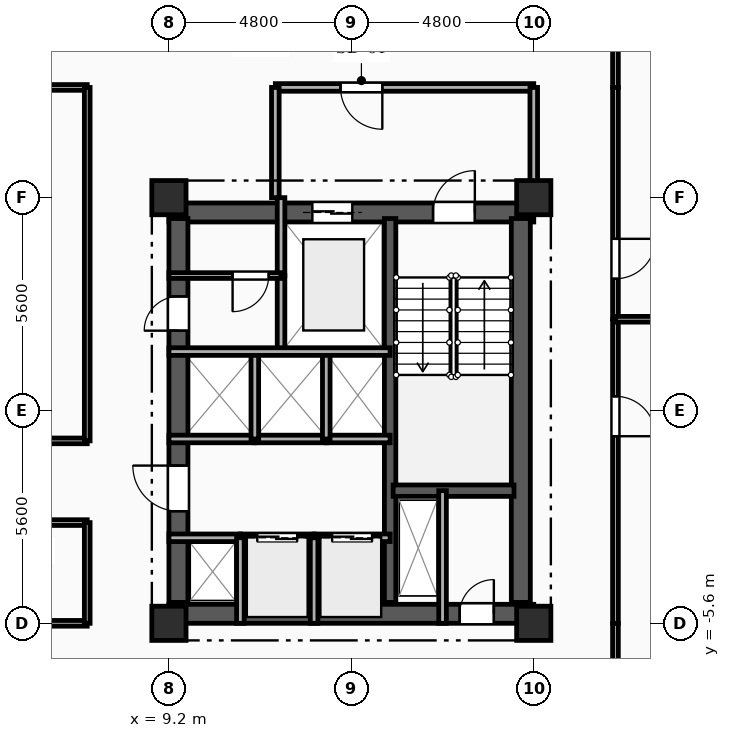
"""IFC4 building model, lengths in metres.
Left out: names, types, materials, properties, quantities, classifications, styles, units other than length and angle.
Written with IfcOpenShell. Run it as: python <this file> out.ifc"""

import sys

from ifc_helpers import new_model, si_unit, direction, frame, frame_2d, origin, origin_2d, place, context, subcontext, project, spatial, rectangle, extrude, element, fill, save


model = new_model("IFC4")
c1 = context("Model", 3, precision=1e-05, world=origin(), true_north=direction((0.0, 1.0)))
c2 = subcontext(c1, "Body", "Model", "MODEL_VIEW")
j1 = project(units=[si_unit("LENGTHUNIT", "METRE"), si_unit("PLANEANGLEUNIT", "RADIAN")], contexts=[c1])
p1 = place(None, origin())
s1 = spatial("IfcSite", under=j1, at=p1, CompositionType="ELEMENT")
p2 = place(p1, origin())
s2 = spatial("IfcBuilding", under=s1, at=p2, CompositionType="ELEMENT")
p3 = place(p2, frame((0.0, 0.0, 171.2)))
s3 = spatial("IfcBuildingStorey", under=s2, at=p3, CompositionType="ELEMENT", Elevation=171.2)
for number, where, z_axis, x_axis in (
    (1, (9.2, -5.6, 0.0), (0.0, 0.0, 1.0), (1.0, 0.0, 0.0)),
    (2, (9.2, 5.6, 0.0), (0.0, 0.0, 1.0), (1.0, 0.0, 0.0)),
    (3, (18.8, -5.6, 0.0), (0.0, 0.0, 1.0), (1.0, 0.0, 0.0)),
    (4, (18.8, 5.6, 0.0), (0.0, 0.0, 1.0), (1.0, 0.0, 0.0)),
):
    element("IfcColumn", number, at=place(p3, frame(where, z_axis=z_axis, x_axis=x_axis)), inside=s3, PredefinedType="COLUMN", context=c2, shape_type="SweptSolid", body=[
        extrude(rectangle(XDim=0.9, YDim=0.9, at=origin_2d()), origin(), (0.0, 0.0, 1.0), 3.35),
    ])
p4 = place(p3, frame((9.2, 5.21, 0.0), z_axis=(0.0, 0.0, 1.0), x_axis=(1.0, 0.0, 0.0)))
e5 = element("IfcWall", 5, at=p4, inside=s3, PredefinedType="SHEAR", context=c2, shape_type="SweptSolid", body=[
    extrude(rectangle(XDim=9.6, YDim=0.5, at=frame_2d((4.8, 0.0))), origin(), (0.0, 0.0, 1.0), 3.0),
])
p5 = place(p4, frame((6.95, 0.0, 0.0)))
e6 = element("IfcOpeningElement", 6, at=p5, cuts=e5, PredefinedType="OPENING", context=c2, shape_type="SweptSolid", body=[
    extrude(rectangle(XDim=1.1, YDim=2.15, at=frame_2d((0.55, 1.075))), frame((0.0, 0.26, 0.0), z_axis=(0.0, -1.0, 0.0), x_axis=(1.0, 0.0, 0.0)), (0.0, 0.0, 1.0), 0.52),
])
p6 = place(p4, frame((3.775, 0.0, 0.0)))
e7 = element("IfcOpeningElement", 7, at=p6, cuts=e5, PredefinedType="OPENING", context=c2, shape_type="SweptSolid", body=[
    extrude(rectangle(XDim=1.05, YDim=2.1, at=frame_2d((0.525, 1.05))), frame((0.0, 0.26, 0.0), z_axis=(0.0, -1.0, 0.0), x_axis=(1.0, 0.0, 0.0)), (0.0, 0.0, 1.0), 0.52),
])
p7 = place(p3, frame((9.2, -5.35, 0.0), z_axis=(0.0, 0.0, 1.0), x_axis=(1.0, 0.0, 0.0)))
e8 = element("IfcWall", 8, at=p7, inside=s3, PredefinedType="SHEAR", context=c2, shape_type="SweptSolid", body=[
    extrude(rectangle(XDim=9.6, YDim=0.5, at=frame_2d((4.8, 0.0))), origin(), (0.0, 0.0, 1.0), 3.0),
])
p8 = place(p7, frame((7.65, 0.0, 0.0)))
e9 = element("IfcOpeningElement", 9, at=p8, cuts=e8, PredefinedType="OPENING", context=c2, shape_type="SweptSolid", body=[
    extrude(rectangle(XDim=0.9, YDim=2.1, at=frame_2d((0.45, 1.05))), frame((0.0, 0.26, 0.0), z_axis=(0.0, -1.0, 0.0), x_axis=(1.0, 0.0, 0.0)), (0.0, 0.0, 1.0), 0.52),
])
p9 = place(p3, frame((9.45, -5.05, 0.0), z_axis=(0.0, 0.0, 1.0), x_axis=(0.0, 1.0, 0.0)))
e10 = element("IfcWall", 10, at=p9, inside=s3, PredefinedType="SHEAR", context=c2, shape_type="SweptSolid", body=[
    extrude(rectangle(XDim=10.1, YDim=0.5, at=frame_2d((5.05, 0.0))), origin(), (0.0, 0.0, 1.0), 3.0),
])
p10 = place(p9, frame((7.15, 0.0, 0.0)))
e11 = element("IfcOpeningElement", 11, at=p10, cuts=e10, PredefinedType="OPENING", context=c2, shape_type="SweptSolid", body=[
    extrude(rectangle(XDim=0.9, YDim=2.1, at=frame_2d((0.45, 1.05))), frame((0.0, 0.26, 0.0), z_axis=(0.0, -1.0, 0.0), x_axis=(1.0, 0.0, 0.0)), (0.0, 0.0, 1.0), 0.52),
])
p11 = place(p9, frame((2.4, 0.0, 0.0)))
e12 = element("IfcOpeningElement", 12, at=p11, cuts=e10, PredefinedType="OPENING", context=c2, shape_type="SweptSolid", body=[
    extrude(rectangle(XDim=1.2, YDim=2.15, at=frame_2d((0.6, 1.075))), frame((0.0, 0.26, 0.0), z_axis=(0.0, -1.0, 0.0), x_axis=(1.0, 0.0, 0.0)), (0.0, 0.0, 1.0), 0.52),
])
p12 = place(p3, frame((18.46, -5.05, 0.0), z_axis=(0.0, 0.0, 1.0), x_axis=(0.0, 1.0, 0.0)))
e13 = element("IfcWall", 13, at=p12, inside=s3, PredefinedType="SHEAR", context=c2, shape_type="SweptSolid", body=[
    extrude(rectangle(XDim=10.1, YDim=0.5, at=frame_2d((5.05, 0.0))), origin(), (0.0, 0.0, 1.0), 3.0),
])
p13 = place(p3, frame((15.02, -5.05, 0.0), z_axis=(0.0, 0.0, 1.0), x_axis=(0.0, 1.0, 0.0)))
e14 = element("IfcWall", 14, at=p13, inside=s3, PredefinedType="SHEAR", context=c2, shape_type="SweptSolid", body=[
    extrude(rectangle(XDim=10.1, YDim=0.3, at=frame_2d((5.05, 0.0))), origin(), (0.0, 0.0, 1.0), 3.0),
])
p14 = place(p3, frame((15.1, -2.11, 0.0), z_axis=(0.0, 0.0, 1.0), x_axis=(1.0, 0.0, 0.0)))
e15 = element("IfcWall", 15, at=p14, inside=s3, PredefinedType="SHEAR", context=c2, shape_type="SweptSolid", body=[
    extrude(rectangle(XDim=3.18, YDim=0.3, at=frame_2d((1.59, 0.0))), origin(), (0.0, 0.0, 1.0), 3.0),
])
p15 = place(p3, frame((16.4, -2.11, 0.0), z_axis=(0.0, 0.0, 1.0), x_axis=(0.0, -1.0, 0.0)))
e16 = element("IfcWall", 16, at=p15, inside=s3, PredefinedType="PARTITIONING", context=c2, shape_type="SweptSolid", body=[
    extrude(rectangle(XDim=3.49, YDim=0.2, at=frame_2d((1.745, 0.0))), origin(), (0.0, 0.0, 1.0), 3.0),
])
p16 = place(p3, frame((12.15, 3.55, 0.0), z_axis=(0.0, 0.0, 1.0), x_axis=(0.0, -1.0, 0.0)))
e17 = element("IfcWall", 17, at=p16, inside=s3, PredefinedType="PARTITIONING", context=c2, shape_type="SweptSolid", body=[
    extrude(rectangle(XDim=2.0, YDim=0.2, at=frame_2d((1.0, 0.0))), origin(), (0.0, 0.0, 1.0), 3.0),
])
p17 = place(p3, frame((12.15, 5.6, 0.0), z_axis=(0.0, 0.0, 1.0), x_axis=(0.0, -1.0, 0.0)))
e18 = element("IfcWall", 18, at=p17, inside=s3, PredefinedType="PARTITIONING", context=c2, shape_type="SweptSolid", body=[
    extrude(rectangle(XDim=2.05, YDim=0.2, at=frame_2d((1.025, 0.0))), origin(), (0.0, 0.0, 1.0), 3.0),
])
p18 = place(p3, frame((18.8, 8.5, 0.0), z_axis=(0.0, 0.0, 1.0), x_axis=(-1.0, 0.0, 0.0)))
e19 = element("IfcWall", 19, at=p18, inside=s3, PredefinedType="PARTITIONING", context=c2, shape_type="SweptSolid", body=[
    extrude(rectangle(XDim=6.8, YDim=0.2, at=frame_2d((3.4, 0.0))), origin(), (0.0, 0.0, 1.0), 3.0),
])
p19 = place(p18, frame((3.985, 0.0, 0.0)))
e20 = element("IfcOpeningElement", 20, at=p19, cuts=e19, PredefinedType="OPENING", context=c2, shape_type="SweptSolid", body=[
    extrude(rectangle(XDim=1.1, YDim=2.15, at=frame_2d((0.55, 1.075))), frame((0.0, 0.11, 0.0), z_axis=(0.0, -1.0, 0.0), x_axis=(1.0, 0.0, 0.0)), (0.0, 0.0, 1.0), 0.22),
])
p20 = place(p3, frame((18.8, 5.6, 0.0), z_axis=(0.0, 0.0, 1.0), x_axis=(0.0, 1.0, 0.0)))
e21 = element("IfcWall", 21, at=p20, inside=s3, PredefinedType="PARTITIONING", context=c2, shape_type="SweptSolid", body=[
    extrude(rectangle(XDim=2.9, YDim=0.2, at=frame_2d((1.45, 0.0))), origin(), (0.0, 0.0, 1.0), 2.485),
])
p21 = place(p3, frame((12.0, 8.5, 0.0), z_axis=(0.0, 0.0, 1.0), x_axis=(0.0, -1.0, 0.0)))
e22 = element("IfcWall", 22, at=p21, inside=s3, PredefinedType="PARTITIONING", context=c2, shape_type="SweptSolid", body=[
    extrude(rectangle(XDim=2.9, YDim=0.2, at=frame_2d((1.45, 0.0))), origin(), (0.0, 0.0, 1.0), 3.0),
])
p22 = place(p3, frame((12.15, 3.55, 0.0), z_axis=(0.0, 0.0, 1.0), x_axis=(-1.0, 0.0, 0.0)))
e23 = element("IfcWall", 23, at=p22, inside=s3, PredefinedType="PARTITIONING", context=c2, shape_type="SweptSolid", body=[
    extrude(rectangle(XDim=2.95, YDim=0.15, at=frame_2d((1.475, 0.0))), origin(), (0.0, 0.0, 1.0), 3.0),
])
p23 = place(p22, frame((0.325, 0.0, 0.0)))
e24 = element("IfcOpeningElement", 24, at=p23, cuts=e23, PredefinedType="OPENING", context=c2, shape_type="SweptSolid", body=[
    extrude(rectangle(XDim=0.95, YDim=2.1, at=frame_2d((0.475, 1.05))), frame((0.0, 0.085, 0.0), z_axis=(0.0, -1.0, 0.0), x_axis=(1.0, 0.0, 0.0)), (0.0, 0.0, 1.0), 0.17),
])
p24 = place(p3, frame((9.2, -3.35, 0.0), z_axis=(0.0, 0.0, 1.0), x_axis=(1.0, 0.0, 0.0)))
e25 = element("IfcWall", 25, at=p24, inside=s3, PredefinedType="PARTITIONING", context=c2, shape_type="SweptSolid", body=[
    extrude(rectangle(XDim=1.88, YDim=0.2, at=frame_2d((0.94, 0.0))), origin(), (0.0, 0.0, 1.0), 2.715),
])
p25 = place(p3, frame((11.08, -3.35, 0.0), z_axis=(0.0, 0.0, 1.0), x_axis=(1.0, 0.0, 0.0)))
e26 = element("IfcWall", 26, at=p25, inside=s3, PredefinedType="PARTITIONING", context=c2, shape_type="SweptSolid", body=[
    extrude(rectangle(XDim=1.94, YDim=0.2, at=frame_2d((0.97, 0.0))), origin(), (0.0, 0.0, 1.0), 3.0),
])
p26 = place(p25, frame((0.445, 0.0, 0.0)))
e27 = element("IfcOpeningElement", 27, at=p26, cuts=e26, PredefinedType="OPENING", context=c2, shape_type="SweptSolid", body=[
    extrude(rectangle(XDim=1.05, YDim=2.1, at=frame_2d((0.525, 1.05))), frame((0.0, 0.11, 0.0), z_axis=(0.0, -1.0, 0.0), x_axis=(1.0, 0.0, 0.0)), (0.0, 0.0, 1.0), 0.22),
])
p27 = place(p3, frame((13.02, -3.35, 0.0), z_axis=(0.0, 0.0, 1.0), x_axis=(1.0, 0.0, 0.0)))
e28 = element("IfcWall", 28, at=p27, inside=s3, PredefinedType="PARTITIONING", context=c2, shape_type="SweptSolid", body=[
    extrude(rectangle(XDim=2.0, YDim=0.2, at=frame_2d((1.0, 0.0))), origin(), (0.0, 0.0, 1.0), 3.0),
])
p28 = place(p27, frame((0.475, 0.0, 0.0)))
e29 = element("IfcOpeningElement", 29, at=p28, cuts=e28, PredefinedType="OPENING", context=c2, shape_type="SweptSolid", body=[
    extrude(rectangle(XDim=1.05, YDim=2.1, at=frame_2d((0.525, 1.05))), frame((0.0, 0.11, 0.0), z_axis=(0.0, -1.0, 0.0), x_axis=(1.0, 0.0, 0.0)), (0.0, 0.0, 1.0), 0.22),
])
p29 = place(p3, frame((11.46, -0.75, 0.0), z_axis=(0.0, 0.0, 1.0), x_axis=(-1.0, 0.0, 0.0)))
e30 = element("IfcWall", 30, at=p29, inside=s3, PredefinedType="PARTITIONING", context=c2, shape_type="SweptSolid", body=[
    extrude(rectangle(XDim=2.26, YDim=0.2, at=frame_2d((1.13, 0.0))), origin(), (0.0, 0.0, 1.0), 3.0),
])
p30 = place(p3, frame((13.34, -0.75, 0.0), z_axis=(0.0, 0.0, 1.0), x_axis=(-1.0, 0.0, 0.0)))
e31 = element("IfcWall", 31, at=p30, inside=s3, PredefinedType="PARTITIONING", context=c2, shape_type="SweptSolid", body=[
    extrude(rectangle(XDim=1.88, YDim=0.2, at=frame_2d((0.94, 0.0))), origin(), (0.0, 0.0, 1.0), 3.0),
])
p31 = place(p3, frame((15.02, -0.75, 0.0), z_axis=(0.0, 0.0, 1.0), x_axis=(-1.0, 0.0, 0.0)))
e32 = element("IfcWall", 32, at=p31, inside=s3, PredefinedType="PARTITIONING", context=c2, shape_type="SweptSolid", body=[
    extrude(rectangle(XDim=1.68, YDim=0.2, at=frame_2d((0.84, 0.0))), origin(), (0.0, 0.0, 1.0), 3.0),
])
for number, where, z_axis, x_axis in (
    (33, (11.08, -5.6, 0.0), (0.0, 0.0, 1.0), (0.0, 1.0, 0.0)),
    (34, (13.02, -5.6, 0.0), (0.0, 0.0, 1.0), (0.0, 1.0, 0.0)),
):
    element("IfcWall", number, at=place(p3, frame(where, z_axis=z_axis, x_axis=x_axis)), inside=s3, PredefinedType="PARTITIONING", context=c2, shape_type="SweptSolid", body=[
        extrude(rectangle(XDim=2.25, YDim=0.2, at=frame_2d((1.125, 0.0))), origin(), (0.0, 0.0, 1.0), 3.0),
    ])
for number, where, z_axis, x_axis in (
    (35, (11.46, -0.75, 0.0), (0.0, 0.0, 1.0), (0.0, 1.0, 0.0)),
    (36, (13.34, -0.75, 0.0), (0.0, 0.0, 1.0), (0.0, 1.0, 0.0)),
):
    element("IfcWall", number, at=place(p3, frame(where, z_axis=z_axis, x_axis=x_axis)), inside=s3, PredefinedType="PARTITIONING", context=c2, shape_type="SweptSolid", body=[
        extrude(rectangle(XDim=2.3, YDim=0.2, at=frame_2d((1.15, 0.0))), origin(), (0.0, 0.0, 1.0), 3.0),
    ])
p32 = place(p3, frame((20.95, 10.65, 0.0), z_axis=(0.0, 0.0, 1.0), x_axis=(0.0, -1.0, 0.0)))
e37 = element("IfcWall", 37, at=p32, inside=s3, PredefinedType="PARTITIONING", context=c2, shape_type="SweptSolid", body=[
    extrude(rectangle(XDim=2.15, YDim=0.15, at=frame_2d((1.075, 0.0))), origin(), (0.0, 0.0, 1.0), 3.0),
])
p33 = place(p3, frame((7.05, 8.5, 0.0), z_axis=(0.0, 0.0, 1.0), x_axis=(-1.0, 0.0, 0.0)))
e38 = element("IfcWall", 38, at=p33, inside=s3, PredefinedType="PARTITIONING", context=c2, shape_type="SweptSolid", body=[
    extrude(rectangle(XDim=7.05, YDim=0.15, at=frame_2d((3.525, 0.0))), origin(), (0.0, 0.0, 1.0), 3.0),
])
p34 = place(p3, frame((20.95, -5.6, 0.0), z_axis=(0.0, 0.0, 1.0), x_axis=(0.0, -1.0, 0.0)))
e39 = element("IfcWall", 39, at=p34, inside=s3, PredefinedType="PARTITIONING", context=c2, shape_type="SweptSolid", body=[
    extrude(rectangle(XDim=2.15, YDim=0.15, at=frame_2d((1.075, 0.0))), origin(), (0.0, 0.0, 1.0), 3.0),
])
p35 = place(p3, frame((0.0, -5.6, 0.0), z_axis=(0.0, 0.0, 1.0), x_axis=(1.0, 0.0, 0.0)))
e40 = element("IfcWall", 40, at=p35, inside=s3, PredefinedType="PARTITIONING", context=c2, shape_type="SweptSolid", body=[
    extrude(rectangle(XDim=7.05, YDim=0.15, at=frame_2d((3.525, 0.0))), origin(), (0.0, 0.0, 1.0), 2.485),
])
p36 = place(p35, frame((1.185, 0.0, 0.0)))
e41 = element("IfcOpeningElement", 41, at=p36, cuts=e40, PredefinedType="OPENING", context=c2, shape_type="SweptSolid", body=[
    extrude(rectangle(XDim=1.05, YDim=2.15, at=frame_2d((0.525, 1.075))), frame((0.0, 0.085, 0.0), z_axis=(0.0, -1.0, 0.0), x_axis=(1.0, 0.0, 0.0)), (0.0, 0.0, 1.0), 0.17),
])
p37 = place(p3, frame((20.95, 2.4, 0.0), z_axis=(0.0, 0.0, 1.0), x_axis=(0.0, -1.0, 0.0)))
e42 = element("IfcWall", 42, at=p37, inside=s3, PredefinedType="PARTITIONING", context=c2, shape_type="SweptSolid", body=[
    extrude(rectangle(XDim=8.0, YDim=0.15, at=frame_2d((4.0, 0.0))), origin(), (0.0, 0.0, 1.0), 3.0),
])
p38 = place(p37, frame((2.028, 0.0, 0.0)))
e43 = element("IfcOpeningElement", 43, at=p38, cuts=e42, PredefinedType="OPENING", context=c2, shape_type="SweptSolid", body=[
    extrude(rectangle(XDim=1.05, YDim=2.15, at=frame_2d((0.525, 1.075))), frame((0.0, 0.085, 0.0), z_axis=(0.0, -1.0, 0.0), x_axis=(1.0, 0.0, 0.0)), (0.0, 0.0, 1.0), 0.17),
])
p39 = place(p3, frame((20.95, 8.5, 0.0), z_axis=(0.0, 0.0, 1.0), x_axis=(0.0, -1.0, 0.0)))
e44 = element("IfcWall", 44, at=p39, inside=s3, PredefinedType="PARTITIONING", context=c2, shape_type="SweptSolid", body=[
    extrude(rectangle(XDim=6.1, YDim=0.15, at=frame_2d((3.05, 0.0))), origin(), (0.0, 0.0, 1.0), 3.0),
])
p40 = place(p39, frame((3.984, 0.0, 0.0)))
e45 = element("IfcOpeningElement", 45, at=p40, cuts=e44, PredefinedType="OPENING", context=c2, shape_type="SweptSolid", body=[
    extrude(rectangle(XDim=1.05, YDim=2.15, at=frame_2d((0.525, 1.075))), frame((0.0, 0.085, 0.0), z_axis=(0.0, -1.0, 0.0), x_axis=(1.0, 0.0, 0.0)), (0.0, 0.0, 1.0), 0.17),
])
p41 = place(p3, frame((-7.05, -0.8, 0.0), z_axis=(0.0, 0.0, 1.0), x_axis=(1.0, 0.0, 0.0)))
e46 = element("IfcWall", 46, at=p41, inside=s3, PredefinedType="PARTITIONING", context=c2, shape_type="SweptSolid", body=[
    extrude(rectangle(XDim=14.1, YDim=0.15, at=frame_2d((7.05, 0.0))), origin(), (0.0, 0.0, 1.0), 3.0),
])
p42 = place(p41, frame((6.525, 0.0, 0.0)))
e47 = element("IfcOpeningElement", 47, at=p42, cuts=e46, PredefinedType="OPENING", context=c2, shape_type="SweptSolid", body=[
    extrude(rectangle(XDim=1.05, YDim=2.15, at=frame_2d((0.525, 1.075))), frame((0.0, 0.085, 0.0), z_axis=(0.0, -1.0, 0.0), x_axis=(1.0, 0.0, 0.0)), (0.0, 0.0, 1.0), 0.17),
])
p43 = place(p3, frame((7.05, -2.95, 0.0), z_axis=(0.0, 0.0, 1.0), x_axis=(-1.0, 0.0, 0.0)))
e48 = element("IfcWall", 48, at=p43, inside=s3, PredefinedType="PARTITIONING", context=c2, shape_type="SweptSolid", body=[
    extrude(rectangle(XDim=7.05, YDim=0.15, at=frame_2d((3.525, 0.0))), origin(), (0.0, 0.0, 1.0), 3.0),
])
p44 = place(p3, frame((7.05, -0.8, 0.0), z_axis=(0.0, 0.0, 1.0), x_axis=(0.0, 1.0, 0.0)))
e49 = element("IfcWall", 49, at=p44, inside=s3, PredefinedType="PARTITIONING", context=c2, shape_type="SweptSolid", body=[
    extrude(rectangle(XDim=9.3, YDim=0.15, at=frame_2d((4.65, 0.0))), origin(), (0.0, 0.0, 1.0), 3.0),
])
p45 = place(p3, frame((7.05, -5.6, 0.0), z_axis=(0.0, 0.0, 1.0), x_axis=(0.0, 1.0, 0.0)))
e50 = element("IfcWall", 50, at=p45, inside=s3, PredefinedType="PARTITIONING", context=c2, shape_type="SweptSolid", body=[
    extrude(rectangle(XDim=2.65, YDim=0.15, at=frame_2d((1.325, 0.0))), origin(), (0.0, 0.0, 1.0), 3.0),
])
p46 = place(p3, frame((20.95, 2.4, 0.0), z_axis=(0.0, 0.0, 1.0), x_axis=(1.0, 0.0, 0.0)))
e51 = element("IfcWall", 51, at=p46, inside=s3, PredefinedType="PARTITIONING", context=c2, shape_type="SweptSolid", body=[
    extrude(rectangle(XDim=6.05, YDim=0.15, at=frame_2d((3.025, 0.0))), origin(), (0.0, 0.0, 1.0), 3.0),
])
p47 = place(p3, frame((9.2, 1.55, 0.0), z_axis=(0.0, 0.0, 1.0), x_axis=(1.0, 0.0, 0.0)))
e52 = element("IfcWall", 52, at=p47, inside=s3, PredefinedType="PARTITIONING", context=c2, shape_type="SweptSolid", body=[
    extrude(rectangle(XDim=5.82, YDim=0.2, at=frame_2d((2.91, 0.0))), origin(), (0.0, 0.0, 1.0), 3.0),
])
p48 = place(p5, origin())
e53 = element("IfcDoor", 53, at=p48, inside=s3, OperationType="SINGLE_SWING_RIGHT", PredefinedType="DOOR", context=c2, shape_type="SweptSolid", body=[
    extrude(rectangle(XDim=1.1, YDim=2.15, at=frame_2d((0.55, 1.075))), frame((0.0, 0.025, 0.0), z_axis=(0.0, -1.0, 0.0), x_axis=(1.0, 0.0, 0.0)), (0.0, 0.0, 1.0), 0.05),
])
fill(e6, e53)
p49 = place(p6, origin())
e54 = element("IfcDoor", 54, at=p49, inside=s3, OperationType="DOUBLE_DOOR_SLIDING", PredefinedType="DOOR", context=c2, shape_type="SweptSolid", body=[
    extrude(rectangle(XDim=1.05, YDim=2.1, at=frame_2d((0.525, 1.05))), frame((0.0, 0.025, 0.0), z_axis=(0.0, -1.0, 0.0), x_axis=(1.0, 0.0, 0.0)), (0.0, 0.0, 1.0), 0.05),
])
fill(e7, e54)
p50 = place(p8, origin())
e55 = element("IfcDoor", 55, at=p50, inside=s3, OperationType="SINGLE_SWING_RIGHT", PredefinedType="DOOR", context=c2, shape_type="SweptSolid", body=[
    extrude(rectangle(XDim=0.9, YDim=2.1, at=frame_2d((0.45, 1.05))), frame((0.0, 0.025, 0.0), z_axis=(0.0, -1.0, 0.0), x_axis=(1.0, 0.0, 0.0)), (0.0, 0.0, 1.0), 0.05),
])
fill(e9, e55)
p51 = place(p19, origin())
e56 = element("IfcDoor", 56, at=p51, inside=s3, OperationType="SINGLE_SWING_LEFT", PredefinedType="DOOR", context=c2, shape_type="SweptSolid", body=[
    extrude(rectangle(XDim=1.1, YDim=2.15, at=frame_2d((0.55, 1.075))), frame((0.0, 0.025, 0.0), z_axis=(0.0, -1.0, 0.0), x_axis=(1.0, 0.0, 0.0)), (0.0, 0.0, 1.0), 0.05),
])
fill(e20, e56)
p52 = place(p23, origin())
e57 = element("IfcDoor", 57, at=p52, inside=s3, OperationType="SINGLE_SWING_RIGHT", PredefinedType="DOOR", context=c2, shape_type="SweptSolid", body=[
    extrude(rectangle(XDim=0.95, YDim=2.1, at=frame_2d((0.475, 1.05))), frame((0.0, 0.025, 0.0), z_axis=(0.0, -1.0, 0.0), x_axis=(1.0, 0.0, 0.0)), (0.0, 0.0, 1.0), 0.05),
])
fill(e24, e57)
p53 = place(p10, origin())
e58 = element("IfcDoor", 58, at=p53, inside=s3, OperationType="SINGLE_SWING_LEFT", PredefinedType="DOOR", context=c2, shape_type="SweptSolid", body=[
    extrude(rectangle(XDim=0.9, YDim=2.1, at=frame_2d((0.45, 1.05))), frame((0.0, 0.025, 0.0), z_axis=(0.0, -1.0, 0.0), x_axis=(1.0, 0.0, 0.0)), (0.0, 0.0, 1.0), 0.05),
])
fill(e11, e58)
p54 = place(p26, origin())
e59 = element("IfcDoor", 59, at=p54, inside=s3, OperationType="DOUBLE_DOOR_SLIDING", PredefinedType="DOOR", context=c2, shape_type="SweptSolid", body=[
    extrude(rectangle(XDim=1.05, YDim=2.1, at=frame_2d((0.525, 1.05))), frame((0.0, 0.025, 0.0), z_axis=(0.0, -1.0, 0.0), x_axis=(1.0, 0.0, 0.0)), (0.0, 0.0, 1.0), 0.05),
])
fill(e27, e59)
p55 = place(p28, origin())
e60 = element("IfcDoor", 60, at=p55, inside=s3, OperationType="DOUBLE_DOOR_SLIDING", PredefinedType="DOOR", context=c2, shape_type="SweptSolid", body=[
    extrude(rectangle(XDim=1.05, YDim=2.1, at=frame_2d((0.525, 1.05))), frame((0.0, 0.025, 0.0), z_axis=(0.0, -1.0, 0.0), x_axis=(1.0, 0.0, 0.0)), (0.0, 0.0, 1.0), 0.05),
])
fill(e29, e60)
p56 = place(p11, origin())
e61 = element("IfcDoor", 61, at=p56, inside=s3, OperationType="SINGLE_SWING_RIGHT", PredefinedType="DOOR", context=c2, shape_type="SweptSolid", body=[
    extrude(rectangle(XDim=1.2, YDim=2.15, at=frame_2d((0.6, 1.075))), frame((0.0, 0.025, 0.0), z_axis=(0.0, -1.0, 0.0), x_axis=(1.0, 0.0, 0.0)), (0.0, 0.0, 1.0), 0.05),
])
fill(e12, e61)
p57 = place(p38, origin())
e62 = element("IfcDoor", 62, at=p57, inside=s3, OperationType="SINGLE_SWING_RIGHT", PredefinedType="DOOR", context=c2, shape_type="SweptSolid", body=[
    extrude(rectangle(XDim=1.05, YDim=2.15, at=frame_2d((0.525, 1.075))), frame((0.0, 0.025, 0.0), z_axis=(0.0, -1.0, 0.0), x_axis=(1.0, 0.0, 0.0)), (0.0, 0.0, 1.0), 0.05),
])
fill(e43, e62)
p58 = place(p40, origin())
e63 = element("IfcDoor", 63, at=p58, inside=s3, OperationType="SINGLE_SWING_LEFT", PredefinedType="DOOR", context=c2, shape_type="SweptSolid", body=[
    extrude(rectangle(XDim=1.05, YDim=2.15, at=frame_2d((0.525, 1.075))), frame((0.0, 0.025, 0.0), z_axis=(0.0, -1.0, 0.0), x_axis=(1.0, 0.0, 0.0)), (0.0, 0.0, 1.0), 0.05),
])
fill(e45, e63)
save(model, sys.argv[1])
